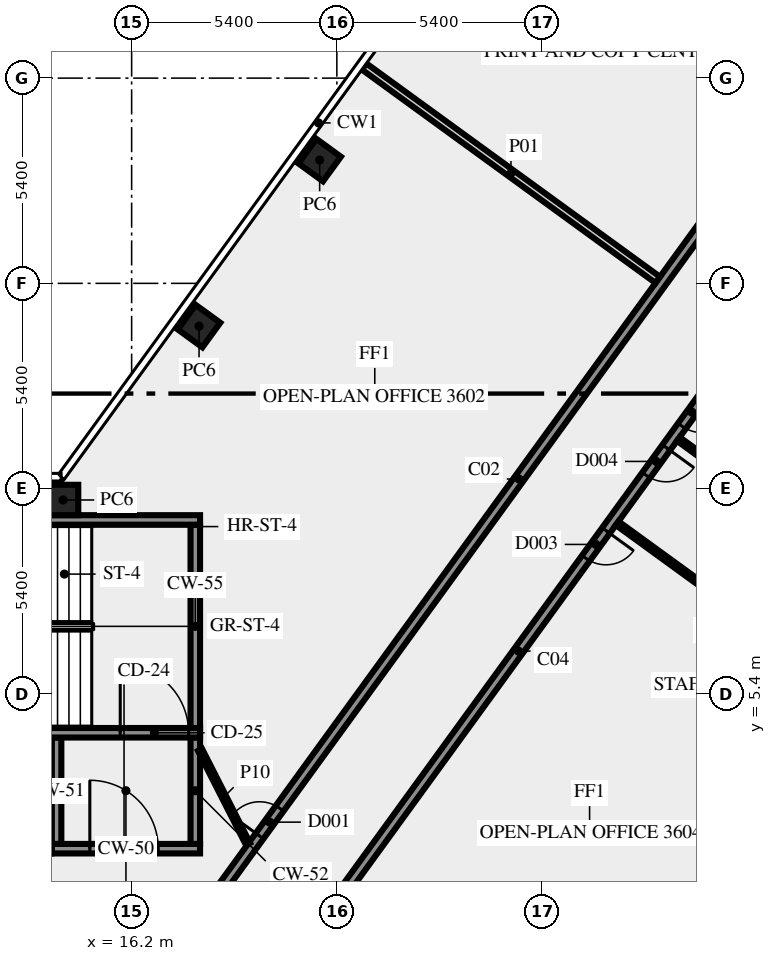
"""IFC4 building model, lengths in metres.
Left out: names, types, materials, properties, quantities, classifications, styles, units other than length and angle.
Written with IfcOpenShell. Run it as: python <this file> out.ifc"""

import sys

from ifc_helpers import new_model, si_unit, direction, frame, frame_2d, origin, origin_2d, place, context, subcontext, project, spatial, rectangle, extrude, element, fill, save


model = new_model("IFC4")
c1 = context("Model", 3, precision=1e-05, world=origin(), true_north=direction((0.0, 1.0)))
c2 = subcontext(c1, "Body", "Model", "MODEL_VIEW")
j1 = project(units=[si_unit("LENGTHUNIT", "METRE"), si_unit("PLANEANGLEUNIT", "RADIAN")], contexts=[c1])
p1 = place(None, origin())
s1 = spatial("IfcSite", under=j1, at=p1, CompositionType="ELEMENT")
p2 = place(p1, origin())
s2 = spatial("IfcBuilding", under=s1, at=p2, CompositionType="ELEMENT")
p3 = place(p2, frame((0.0, 0.0, 156.0)))
s3 = spatial("IfcBuildingStorey", under=s2, at=p3, CompositionType="ELEMENT", Elevation=156.0)
for number, where, z_axis, x_axis in (
    (1, (21.147, 19.444, 0.0), (0.0, 0.0, 1.0), (-0.588, -0.809, 0.0)),
    (2, (17.974, 15.075, 0.0), (0.0, 0.0, 1.0), (-0.588, -0.809, 0.0)),
    (3, (14.395, 10.5, 0.0), (0.0, 0.0, 1.0), (-1.0, 0.0, 0.0)),
):
    element("IfcColumn", number, at=place(p3, frame(where, z_axis=z_axis, x_axis=x_axis)), inside=s3, PredefinedType="COLUMN", context=c2, shape_type="SweptSolid", body=[
        extrude(rectangle(XDim=0.8, YDim=0.8, at=origin_2d()), origin(), (0.0, 0.0, 1.0), 3.65),
    ])
p4 = place(p3, frame((14.1, 1.325, 0.0), z_axis=(0.0, 0.0, 1.0), x_axis=(1.0, 0.0, 0.0)))
e4 = element("IfcWall", 4, at=p4, inside=s3, PredefinedType="SHEAR", context=c2, shape_type="SweptSolid", body=[
    extrude(rectangle(XDim=3.9, YDim=0.25, at=frame_2d((1.95, 0.0))), origin(), (0.0, 0.0, 1.0), 3.65),
])
p5 = place(p4, frame((1.0, 0.0, 0.0)))
e5 = element("IfcOpeningElement", 5, at=p5, cuts=e4, PredefinedType="OPENING", context=c2, shape_type="SweptSolid", body=[
    extrude(rectangle(XDim=1.8, YDim=2.1, at=frame_2d((0.9, 1.05))), frame((0.0, 0.135, 0.0), z_axis=(0.0, -1.0, 0.0), x_axis=(1.0, 0.0, 0.0)), (0.0, 0.0, 1.0), 0.27),
])
for number, where, z_axis, x_axis in (
    (6, (14.225, 1.45, 0.0), (0.0, 0.0, 1.0), (0.0, 1.0, 0.0)),
    (7, (17.875, 1.45, 0.0), (0.0, 0.0, 1.0), (0.0, 1.0, 0.0)),
):
    element("IfcWall", number, at=place(p3, frame(where, z_axis=z_axis, x_axis=x_axis)), inside=s3, PredefinedType="SHEAR", context=c2, shape_type="SweptSolid", body=[
        extrude(rectangle(XDim=2.8, YDim=0.25, at=frame_2d((1.4, 0.0))), origin(), (0.0, 0.0, 1.0), 3.65),
    ])
p6 = place(p3, frame((7.5, 4.375, 0.0), z_axis=(0.0, 0.0, 1.0), x_axis=(1.0, 0.0, 0.0)))
e8 = element("IfcWall", 8, at=p6, inside=s3, PredefinedType="SHEAR", context=c2, shape_type="SweptSolid", body=[
    extrude(rectangle(XDim=10.5, YDim=0.25, at=frame_2d((5.25, 0.0))), origin(), (0.0, 0.0, 1.0), 3.65),
])
p7 = place(p6, frame((8.4, 0.0, 0.0)))
e9 = element("IfcOpeningElement", 9, at=p7, cuts=e8, PredefinedType="OPENING", context=c2, shape_type="SweptSolid", body=[
    extrude(rectangle(XDim=1.8, YDim=2.1, at=frame_2d((0.9, 1.05))), frame((0.0, 0.135, 0.0), z_axis=(0.0, -1.0, 0.0), x_axis=(1.0, 0.0, 0.0)), (0.0, 0.0, 1.0), 0.27),
])
p8 = place(p3, frame((17.875, 4.5, 0.0), z_axis=(0.0, 0.0, 1.0), x_axis=(0.0, 1.0, 0.0)))
e10 = element("IfcWall", 10, at=p8, inside=s3, PredefinedType="SHEAR", context=c2, shape_type="SweptSolid", body=[
    extrude(rectangle(XDim=5.35, YDim=0.25, at=frame_2d((2.675, 0.0))), origin(), (0.0, 0.0, 1.0), 3.65),
])
p9 = place(p3, frame((7.5, 9.975, 0.0), z_axis=(0.0, 0.0, 1.0), x_axis=(1.0, 0.0, 0.0)))
e11 = element("IfcWall", 11, at=p9, inside=s3, PredefinedType="SHEAR", context=c2, shape_type="SweptSolid", body=[
    extrude(rectangle(XDim=10.5, YDim=0.25, at=frame_2d((5.25, 0.0))), origin(), (0.0, 0.0, 1.0), 3.65),
])
p10 = place(p9, frame((2.0, 0.0, 1.0)))
e12 = element("IfcOpeningElement", 12, at=p10, cuts=e11, PredefinedType="OPENING", context=c2, shape_type="SweptSolid", body=[
    extrude(rectangle(XDim=1.2, YDim=1.2, at=frame_2d((0.6, 0.6))), frame((0.0, 0.135, 0.0), z_axis=(0.0, -1.0, 0.0), x_axis=(1.0, 0.0, 0.0)), (0.0, 0.0, 1.0), 0.27),
])
p11 = place(p3, frame((17.545, -1.125, 0.0), z_axis=(0.0, 0.0, 1.0), x_axis=(0.587786330937, 0.809016210693, 0.0)))
e13 = element("IfcWall", 13, at=p11, inside=s3, PredefinedType="SOLIDWALL", context=c2, shape_type="SweptSolid", body=[
    extrude(rectangle(XDim=30.103, YDim=0.25, at=frame_2d((15.052, 0.0))), origin(), (0.0, 0.0, 1.0), 3.65),
])
p12 = place(p11, frame((3.441, 0.0, 0.0)))
e14 = element("IfcOpeningElement", 14, at=p12, cuts=e13, PredefinedType="OPENING", context=c2, shape_type="SweptSolid", body=[
    extrude(rectangle(XDim=0.9, YDim=2.1, at=frame_2d((0.45, 1.05))), frame((0.0, 0.135, 0.0), z_axis=(0.0, -1.0, 0.0), x_axis=(1.0, 0.0, 0.0)), (0.0, 0.0, 1.0), 0.27),
])
p13 = place(p11, frame((28.729, 0.0, 0.0)))
e15 = element("IfcOpeningElement", 15, at=p13, cuts=e13, PredefinedType="OPENING", context=c2, shape_type="SweptSolid", body=[
    extrude(rectangle(XDim=0.9, YDim=2.1, at=frame_2d((0.45, 1.05))), frame((0.0, 0.135, 0.0), z_axis=(0.0, -1.0, 0.0), x_axis=(1.0, 0.0, 0.0)), (0.0, 0.0, 1.0), 0.27),
])
p14 = place(p3, frame((37.236, 21.469, 0.0), z_axis=(0.0, 0.0, 1.0), x_axis=(-0.58778344073, -0.809018310549, 0.0)))
e16 = element("IfcWall", 16, at=p14, inside=s3, PredefinedType="SOLIDWALL", context=c2, shape_type="SweptSolid", body=[
    extrude(rectangle(XDim=28.42, YDim=0.25, at=frame_2d((14.21, 0.0))), origin(), (0.0, 0.0, 1.0), 3.65),
])
p15 = place(p14, frame((14.554, 0.0, 0.0)))
e17 = element("IfcOpeningElement", 17, at=p15, cuts=e16, PredefinedType="OPENING", context=c2, shape_type="SweptSolid", body=[
    extrude(rectangle(XDim=0.9, YDim=2.1, at=frame_2d((0.45, 1.05))), frame((0.0, 0.135, 0.0), z_axis=(0.0, -1.0, 0.0), x_axis=(1.0, 0.0, 0.0)), (0.0, 0.0, 1.0), 0.27),
])
p16 = place(p14, frame((10.255, 0.0, 0.0)))
e18 = element("IfcOpeningElement", 18, at=p16, cuts=e16, PredefinedType="OPENING", context=c2, shape_type="SweptSolid", body=[
    extrude(rectangle(XDim=0.9, YDim=2.1, at=frame_2d((0.45, 1.05))), frame((0.0, 0.135, 0.0), z_axis=(0.0, -1.0, 0.0), x_axis=(1.0, 0.0, 0.0)), (0.0, 0.0, 1.0), 0.27),
])
p17 = place(p14, frame((11.854, 0.0, 0.0)))
e19 = element("IfcOpeningElement", 19, at=p17, cuts=e16, PredefinedType="OPENING", context=c2, shape_type="SweptSolid", body=[
    extrude(rectangle(XDim=0.9, YDim=2.1, at=frame_2d((0.45, 1.05))), frame((0.0, 0.135, 0.0), z_axis=(0.0, -1.0, 0.0), x_axis=(1.0, 0.0, 0.0)), (0.0, 0.0, 1.0), 0.27),
])
p18 = place(p3, frame((30.044, 16.292, 0.0), z_axis=(0.0, 0.0, 1.0), x_axis=(-0.80898585166, 0.587828114175, 0.0)))
e20 = element("IfcWall", 20, at=p18, inside=s3, PredefinedType="SOLIDWALL", context=c2, shape_type="SweptSolid", body=[
    extrude(rectangle(XDim=9.55, YDim=0.2, at=frame_2d((4.775, 0.0))), origin(), (0.0, 0.0, 1.0), 2.85),
])
p19 = place(p3, frame((36.702, 4.274, 0.0), z_axis=(0.0, 0.0, 1.0), x_axis=(-0.808998008689, 0.58781138296, 0.0)))
e21 = element("IfcWall", 21, at=p19, inside=s3, PredefinedType="PARTITIONING", context=c2, shape_type="SweptSolid", body=[
    extrude(rectangle(XDim=9.55, YDim=0.12, at=frame_2d((4.775, 0.0))), origin(), (0.0, 0.0, 1.0), 2.85),
])
p20 = place(p3, frame((30.587, 12.104, 0.0), z_axis=(0.0, 0.0, 1.0), x_axis=(0.807584089733, -0.589752437902, 0.0)))
e22 = element("IfcWall", 22, at=p20, inside=s3, PredefinedType="PARTITIONING", context=c2, shape_type="SweptSolid", body=[
    extrude(rectangle(XDim=8.645, YDim=0.12, at=frame_2d((4.322, 0.0))), origin(), (0.0, 0.0, 1.0), 3.65),
])
p21 = place(p3, frame((18.0, 3.925, 0.0), z_axis=(0.0, 0.0, 1.0), x_axis=(0.453950796792, -0.891026752736, 0.0)))
e23 = element("IfcWall", 23, at=p21, inside=s3, PredefinedType="PARTITIONING", context=c2, shape_type="SweptSolid", body=[
    extrude(rectangle(XDim=2.778, YDim=0.12, at=frame_2d((1.389, 0.0))), origin(), (0.0, 0.0, 1.0), 3.65),
])
p22 = place(p5, origin())
e24 = element("IfcDoor", 24, at=p22, inside=s3, OperationType="DOUBLE_DOOR_SINGLE_SWING", PredefinedType="DOOR", context=c2, shape_type="SweptSolid", body=[
    extrude(rectangle(XDim=1.8, YDim=2.1, at=frame_2d((0.9, 1.05))), frame((0.0, 0.025, 0.0), z_axis=(0.0, -1.0, 0.0), x_axis=(1.0, 0.0, 0.0)), (0.0, 0.0, 1.0), 0.05),
])
fill(e5, e24)
p23 = place(p7, origin())
e25 = element("IfcDoor", 25, at=p23, inside=s3, OperationType="DOUBLE_DOOR_SINGLE_SWING", PredefinedType="DOOR", context=c2, shape_type="SweptSolid", body=[
    extrude(rectangle(XDim=1.8, YDim=2.1, at=frame_2d((0.9, 1.05))), frame((0.0, 0.025, 0.0), z_axis=(0.0, -1.0, 0.0), x_axis=(1.0, 0.0, 0.0)), (0.0, 0.0, 1.0), 0.05),
])
fill(e9, e25)
p24 = place(p12, origin())
e26 = element("IfcDoor", 26, at=p24, inside=s3, OperationType="SINGLE_SWING_LEFT", PredefinedType="DOOR", context=c2, shape_type="SweptSolid", body=[
    extrude(rectangle(XDim=0.9, YDim=2.1, at=frame_2d((0.45, 1.05))), frame((0.0, 0.025, 0.0), z_axis=(0.0, -1.0, 0.0), x_axis=(1.0, 0.0, 0.0)), (0.0, 0.0, 1.0), 0.05),
])
fill(e14, e26)
p25 = place(p15, origin())
e27 = element("IfcDoor", 27, at=p25, inside=s3, OperationType="SINGLE_SWING_LEFT", PredefinedType="DOOR", context=c2, shape_type="SweptSolid", body=[
    extrude(rectangle(XDim=0.9, YDim=2.1, at=frame_2d((0.45, 1.05))), frame((0.0, 0.025, 0.0), z_axis=(0.0, -1.0, 0.0), x_axis=(1.0, 0.0, 0.0)), (0.0, 0.0, 1.0), 0.05),
])
fill(e17, e27)
p26 = place(p16, origin())
e28 = element("IfcDoor", 28, at=p26, inside=s3, OperationType="SINGLE_SWING_RIGHT", PredefinedType="DOOR", context=c2, shape_type="SweptSolid", body=[
    extrude(rectangle(XDim=0.9, YDim=2.1, at=frame_2d((0.45, 1.05))), frame((0.0, 0.025, 0.0), z_axis=(0.0, -1.0, 0.0), x_axis=(1.0, 0.0, 0.0)), (0.0, 0.0, 1.0), 0.05),
])
fill(e18, e28)
p27 = place(p17, origin())
e29 = element("IfcDoor", 29, at=p27, inside=s3, OperationType="SINGLE_SWING_LEFT", PredefinedType="DOOR", context=c2, shape_type="SweptSolid", body=[
    extrude(rectangle(XDim=0.9, YDim=2.1, at=frame_2d((0.45, 1.05))), frame((0.0, 0.025, 0.0), z_axis=(0.0, -1.0, 0.0), x_axis=(1.0, 0.0, 0.0)), (0.0, 0.0, 1.0), 0.05),
])
fill(e19, e29)
save(model, sys.argv[1])
